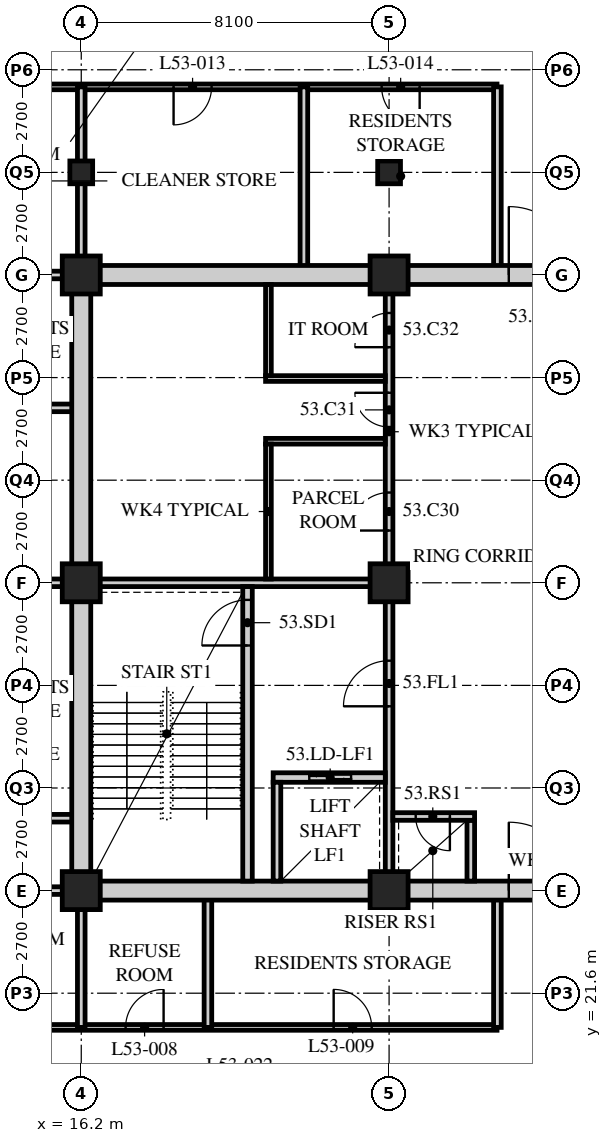
"""IFC4 building model, lengths in metres.
Left out: names, types, materials, properties, quantities, classifications, styles, units other than length and angle.
Written with IfcOpenShell. Run it as: python <this file> out.ifc"""

import sys

from ifc_helpers import new_model, si_unit, direction, frame, frame_2d, origin, origin_2d, place, context, subcontext, project, spatial, rectangle, hollow_rectangle, extrude, element, fill, save


model = new_model("IFC4")
c1 = context("Model", 3, precision=1e-05, world=origin(), true_north=direction((0.0, 1.0)))
c2 = subcontext(c1, "Body", "Model", "MODEL_VIEW")
j1 = project(units=[si_unit("LENGTHUNIT", "METRE"), si_unit("PLANEANGLEUNIT", "RADIAN")], contexts=[c1])
p1 = place(None, origin())
s1 = spatial("IfcSite", under=j1, at=p1, CompositionType="ELEMENT")
p2 = place(p1, origin())
s2 = spatial("IfcBuilding", under=s1, at=p2, CompositionType="ELEMENT")
p3 = place(p2, frame((0.0, 0.0, 206.4)))
s3 = spatial("IfcBuildingStorey", under=s2, at=p3, CompositionType="ELEMENT", Elevation=206.4)
for number, where, z_axis, x_axis in (
    (1, (16.2, 24.3, 0.0), (0.0, 0.0, 1.0), (1.0, 0.0, 0.0)),
    (2, (16.2, 32.4, 0.0), (0.0, 0.0, 1.0), (1.0, 0.0, 0.0)),
    (3, (16.2, 40.5, 0.0), (0.0, 0.0, 1.0), (1.0, 0.0, 0.0)),
):
    element("IfcColumn", number, at=place(p3, frame(where, z_axis=z_axis, x_axis=x_axis)), inside=s3, PredefinedType="COLUMN", context=c2, shape_type="SweptSolid", body=[
        extrude(hollow_rectangle(XDim=1.0, YDim=1.0, WallThickness=0.1, at=origin_2d()), origin(), (0.0, 0.0, 1.0), 3.6),
    ])
p4 = place(p3, frame((16.2, 43.2, 0.0), z_axis=(0.0, 0.0, 1.0), x_axis=(1.0, 0.0, 0.0)))
e4 = element("IfcColumn", 4, at=p4, inside=s3, PredefinedType="COLUMN", context=c2, shape_type="SweptSolid", body=[
    extrude(hollow_rectangle(XDim=0.6, YDim=0.6, WallThickness=0.05, at=origin_2d()), origin(), (0.0, 0.0, 1.0), 3.6),
])
for number, where, z_axis, x_axis in (
    (5, (24.3, 24.3, 0.0), (0.0, 0.0, 1.0), (1.0, 0.0, 0.0)),
    (6, (24.3, 32.4, 0.0), (0.0, 0.0, 1.0), (1.0, 0.0, 0.0)),
    (7, (24.3, 40.5, 0.0), (0.0, 0.0, 1.0), (1.0, 0.0, 0.0)),
):
    element("IfcColumn", number, at=place(p3, frame(where, z_axis=z_axis, x_axis=x_axis)), inside=s3, PredefinedType="COLUMN", context=c2, shape_type="SweptSolid", body=[
        extrude(hollow_rectangle(XDim=1.0, YDim=1.0, WallThickness=0.1, at=origin_2d()), origin(), (0.0, 0.0, 1.0), 3.6),
    ])
p5 = place(p3, frame((24.3, 43.2, 0.0), z_axis=(0.0, 0.0, 1.0), x_axis=(1.0, 0.0, 0.0)))
e8 = element("IfcColumn", 8, at=p5, inside=s3, PredefinedType="COLUMN", context=c2, shape_type="SweptSolid", body=[
    extrude(hollow_rectangle(XDim=0.6, YDim=0.6, WallThickness=0.05, at=origin_2d()), origin(), (0.0, 0.0, 1.0), 3.6),
])
p6 = place(p3, frame((27.14, 45.45, 0.0), z_axis=(0.0, 0.0, 1.0), x_axis=(-1.0, 0.0, 0.0)))
e9 = element("IfcWall", 9, at=p6, inside=s3, PredefinedType="PARTITIONING", context=c2, shape_type="SweptSolid", body=[
    extrude(rectangle(XDim=17.24, YDim=0.15, at=frame_2d((8.62, 0.0))), origin(), (0.0, 0.0, 1.0), 3.39),
])
p7 = place(p6, frame((15.94, 0.0, 0.0)))
e10 = element("IfcOpeningElement", 10, at=p7, cuts=e9, PredefinedType="OPENING", context=c2, shape_type="SweptSolid", body=[
    extrude(rectangle(XDim=1.0, YDim=2.1, at=frame_2d((0.5, 1.05))), frame((0.0, 0.085, 0.0), z_axis=(0.0, -1.0, 0.0), x_axis=(1.0, 0.0, 0.0)), (0.0, 0.0, 1.0), 0.17),
])
p8 = place(p6, frame((12.79, 0.0, 0.0)))
e11 = element("IfcOpeningElement", 11, at=p8, cuts=e9, PredefinedType="OPENING", context=c2, shape_type="SweptSolid", body=[
    extrude(rectangle(XDim=1.0, YDim=2.1, at=frame_2d((0.5, 1.05))), frame((0.0, 0.085, 0.0), z_axis=(0.0, -1.0, 0.0), x_axis=(1.0, 0.0, 0.0)), (0.0, 0.0, 1.0), 0.17),
])
p9 = place(p6, frame((7.511, 0.0, 0.0)))
e12 = element("IfcOpeningElement", 12, at=p9, cuts=e9, PredefinedType="OPENING", context=c2, shape_type="SweptSolid", body=[
    extrude(rectangle(XDim=1.0, YDim=2.1, at=frame_2d((0.5, 1.05))), frame((0.0, 0.085, 0.0), z_axis=(0.0, -1.0, 0.0), x_axis=(1.0, 0.0, 0.0)), (0.0, 0.0, 1.0), 0.17),
])
p10 = place(p6, frame((2.036, 0.0, 0.0)))
e13 = element("IfcOpeningElement", 13, at=p10, cuts=e9, PredefinedType="OPENING", context=c2, shape_type="SweptSolid", body=[
    extrude(rectangle(XDim=1.0, YDim=2.1, at=frame_2d((0.5, 1.05))), frame((0.0, 0.085, 0.0), z_axis=(0.0, -1.0, 0.0), x_axis=(1.0, 0.0, 0.0)), (0.0, 0.0, 1.0), 0.17),
])
p11 = place(p3, frame((9.9, 20.7, 0.0), z_axis=(0.0, 0.0, 1.0), x_axis=(1.0, 0.0, 0.0)))
e14 = element("IfcWall", 14, at=p11, inside=s3, PredefinedType="PARTITIONING", context=c2, shape_type="SweptSolid", body=[
    extrude(rectangle(XDim=17.24, YDim=0.15, at=frame_2d((8.62, 0.0))), origin(), (0.0, 0.0, 1.0), 3.39),
])
p12 = place(p11, frame((2.65, 0.0, 0.0)))
e15 = element("IfcOpeningElement", 15, at=p12, cuts=e14, PredefinedType="OPENING", context=c2, shape_type="SweptSolid", body=[
    extrude(rectangle(XDim=1.0, YDim=2.1, at=frame_2d((0.5, 1.05))), frame((0.0, 0.085, 0.0), z_axis=(0.0, -1.0, 0.0), x_axis=(1.0, 0.0, 0.0)), (0.0, 0.0, 1.0), 0.17),
])
p13 = place(p11, frame((7.467, 0.0, 0.0)))
e16 = element("IfcOpeningElement", 16, at=p13, cuts=e14, PredefinedType="OPENING", context=c2, shape_type="SweptSolid", body=[
    extrude(rectangle(XDim=1.0, YDim=2.1, at=frame_2d((0.5, 1.05))), frame((0.0, 0.085, 0.0), z_axis=(0.0, -1.0, 0.0), x_axis=(1.0, 0.0, 0.0)), (0.0, 0.0, 1.0), 0.17),
])
p14 = place(p11, frame((12.942, 0.0, 0.0)))
e17 = element("IfcOpeningElement", 17, at=p14, cuts=e14, PredefinedType="OPENING", context=c2, shape_type="SweptSolid", body=[
    extrude(rectangle(XDim=1.0, YDim=2.1, at=frame_2d((0.5, 1.05))), frame((0.0, 0.085, 0.0), z_axis=(0.0, -1.0, 0.0), x_axis=(1.0, 0.0, 0.0)), (0.0, 0.0, 1.0), 0.17),
])
for number, where, z_axis, x_axis in (
    (18, (9.9, 32.4, 0.0), (0.0, 0.0, 1.0), (1.0, 0.0, 0.0)),
    (19, (9.9, 26.205, 0.0), (0.0, 0.0, 1.0), (1.0, 0.0, 0.0)),
    (20, (9.9, 37.003, 0.0), (0.0, 0.0, 1.0), (1.0, 0.0, 0.0)),
):
    element("IfcWall", number, at=place(p3, frame(where, z_axis=z_axis, x_axis=x_axis)), inside=s3, PredefinedType="SOLIDWALL", context=c2, shape_type="SweptSolid", body=[
        extrude(rectangle(XDim=6.3, YDim=0.2, at=frame_2d((3.15, 0.0))), origin(), (0.0, 0.0, 1.0), 3.39),
    ])
p15 = place(p3, frame((16.2, 20.7, 0.0), z_axis=(0.0, 0.0, 1.0), x_axis=(0.0, 1.0, 0.0)))
e21 = element("IfcWall", 21, at=p15, inside=s3, PredefinedType="SOLIDWALL", context=c2, shape_type="SweptSolid", body=[
    extrude(rectangle(XDim=3.6, YDim=0.2, at=frame_2d((1.8, 0.0))), origin(), (0.0, 0.0, 1.0), 2.778),
])
for number, where, z_axis, x_axis in (
    (22, (19.533, 20.7, 0.0), (0.0, 0.0, 1.0), (0.0, 1.0, 0.0)),
    (23, (27.15, 20.7, 0.0), (0.0, 0.0, 1.0), (0.0, 1.0, 0.0)),
):
    element("IfcWall", number, at=place(p3, frame(where, z_axis=z_axis, x_axis=x_axis)), inside=s3, PredefinedType="SOLIDWALL", context=c2, shape_type="SweptSolid", body=[
        extrude(rectangle(XDim=3.6, YDim=0.2, at=frame_2d((1.8, 0.0))), origin(), (0.0, 0.0, 1.0), 3.39),
    ])
p16 = place(p3, frame((16.2, 40.5, 0.0), z_axis=(0.0, 0.0, 1.0), x_axis=(0.0, 1.0, 0.0)))
e24 = element("IfcWall", 24, at=p16, inside=s3, PredefinedType="SOLIDWALL", context=c2, shape_type="SweptSolid", body=[
    extrude(rectangle(XDim=4.95, YDim=0.2, at=frame_2d((2.475, 0.0))), origin(), (0.0, 0.0, 1.0), 2.69),
])
for number, where, z_axis, x_axis in (
    (25, (22.059, 45.45, 0.0), (0.0, 0.0, 1.0), (0.0, -1.0, 0.0)),
    (26, (27.15, 40.5, 0.0), (0.0, 0.0, 1.0), (0.0, 1.0, 0.0)),
):
    element("IfcWall", number, at=place(p3, frame(where, z_axis=z_axis, x_axis=x_axis)), inside=s3, PredefinedType="SOLIDWALL", context=c2, shape_type="SweptSolid", body=[
        extrude(rectangle(XDim=4.95, YDim=0.2, at=frame_2d((2.475, 0.0))), origin(), (0.0, 0.0, 1.0), 3.39),
    ])
for number, where, z_axis, x_axis in (
    (27, (9.9, 24.3, 0.0), (0.0, 0.0, 1.0), (1.0, 0.0, 0.0)),
    (28, (9.9, 40.5, 0.0), (0.0, 0.0, 1.0), (1.0, 0.0, 0.0)),
):
    element("IfcWall", number, at=place(p3, frame(where, z_axis=z_axis, x_axis=x_axis)), inside=s3, PredefinedType="SOLIDWALL", context=c2, shape_type="SweptSolid", body=[
        extrude(rectangle(XDim=6.3, YDim=0.2, at=frame_2d((3.15, 0.0))), origin(), (0.0, 0.0, 1.0), 3.39),
    ])
p17 = place(p3, frame((15.95, 24.3, 0.0), z_axis=(0.0, 0.0, 1.0), x_axis=(1.0, 0.0, 0.0)))
e29 = element("IfcWall", 29, at=p17, inside=s3, PredefinedType="SOLIDWALL", context=c2, shape_type="SweptSolid", body=[
    extrude(rectangle(XDim=24.8, YDim=0.5, at=frame_2d((12.4, 0.0))), origin(), (0.0, 0.0, 1.0), 2.74),
])
p18 = place(p17, frame((11.5, 0.0, 0.0)))
e30 = element("IfcOpeningElement", 30, at=p18, cuts=e29, PredefinedType="OPENING", context=c2, shape_type="SweptSolid", body=[
    extrude(rectangle(XDim=1.8, YDim=2.4, at=frame_2d((0.9, 1.2))), frame((0.0, 0.26, 0.0), z_axis=(0.0, -1.0, 0.0), x_axis=(1.0, 0.0, 0.0)), (0.0, 0.0, 1.0), 0.52),
])
p19 = place(p3, frame((15.95, 40.5, 0.0), z_axis=(0.0, 0.0, 1.0), x_axis=(1.0, 0.0, 0.0)))
e31 = element("IfcWall", 31, at=p19, inside=s3, PredefinedType="SOLIDWALL", context=c2, shape_type="SweptSolid", body=[
    extrude(rectangle(XDim=24.8, YDim=0.5, at=frame_2d((12.4, 0.0))), origin(), (0.0, 0.0, 1.0), 2.74),
])
p20 = place(p19, frame((11.5, 0.0, 0.0)))
e32 = element("IfcOpeningElement", 32, at=p20, cuts=e31, PredefinedType="OPENING", context=c2, shape_type="SweptSolid", body=[
    extrude(rectangle(XDim=1.8, YDim=2.4, at=frame_2d((0.9, 1.2))), frame((0.0, 0.26, 0.0), z_axis=(0.0, -1.0, 0.0), x_axis=(1.0, 0.0, 0.0)), (0.0, 0.0, 1.0), 0.52),
])
p21 = place(p3, frame((16.2, 24.55, 0.0), z_axis=(0.0, 0.0, 1.0), x_axis=(0.0, 1.0, 0.0)))
e33 = element("IfcWall", 33, at=p21, inside=s3, PredefinedType="SOLIDWALL", context=c2, shape_type="SweptSolid", body=[
    extrude(rectangle(XDim=15.7, YDim=0.5, at=frame_2d((7.85, 0.0))), origin(), (0.0, 0.0, 1.0), 2.778),
])
p22 = place(p3, frame((16.45, 32.4, 0.0), z_axis=(0.0, 0.0, 1.0), x_axis=(1.0, 0.0, 0.0)))
e34 = element("IfcWall", 34, at=p22, inside=s3, PredefinedType="SOLIDWALL", context=c2, shape_type="SweptSolid", body=[
    extrude(rectangle(XDim=7.95, YDim=0.2, at=frame_2d((3.975, 0.0))), origin(), (0.0, 0.0, 1.0), 2.778),
])
p23 = place(p3, frame((24.3, 24.55, 0.0), z_axis=(0.0, 0.0, 1.0), x_axis=(0.0, 1.0, 0.0)))
e35 = element("IfcWall", 35, at=p23, inside=s3, PredefinedType="SOLIDWALL", context=c2, shape_type="SweptSolid", body=[
    extrude(rectangle(XDim=7.75, YDim=0.2, at=frame_2d((3.875, 0.0))), origin(), (0.0, 0.0, 1.0), 2.778),
])
p24 = place(p23, frame((4.6, 0.0, 0.0)))
e36 = element("IfcOpeningElement", 36, at=p24, cuts=e35, PredefinedType="OPENING", context=c2, shape_type="SweptSolid", body=[
    extrude(rectangle(XDim=1.2, YDim=2.1, at=frame_2d((0.6, 1.05))), frame((0.0, 0.11, 0.0), z_axis=(0.0, -1.0, 0.0), x_axis=(1.0, 0.0, 0.0)), (0.0, 0.0, 1.0), 0.22),
])
p25 = place(p3, frame((20.575, 24.55, 0.0), z_axis=(0.0, 0.0, 1.0), x_axis=(0.0, 1.0, 0.0)))
e37 = element("IfcWall", 37, at=p25, inside=s3, PredefinedType="SOLIDWALL", context=c2, shape_type="SweptSolid", body=[
    extrude(rectangle(XDim=7.75, YDim=0.25, at=frame_2d((3.875, 0.0))), origin(), (0.0, 0.0, 1.0), 3.39),
])
p26 = place(p25, frame((6.2, 0.0, 0.0)))
e38 = element("IfcOpeningElement", 38, at=p26, cuts=e37, PredefinedType="OPENING", context=c2, shape_type="SweptSolid", body=[
    extrude(rectangle(XDim=1.2, YDim=2.1, at=frame_2d((0.6, 1.05))), frame((0.0, 0.135, 0.0), z_axis=(0.0, -1.0, 0.0), x_axis=(1.0, 0.0, 0.0)), (0.0, 0.0, 1.0), 0.27),
])
p27 = place(p3, frame((21.25, 27.275, 0.0), z_axis=(0.0, 0.0, 1.0), x_axis=(1.0, 0.0, 0.0)))
e39 = element("IfcWall", 39, at=p27, inside=s3, PredefinedType="SOLIDWALL", context=c2, shape_type="SweptSolid", body=[
    extrude(rectangle(XDim=2.95, YDim=0.25, at=frame_2d((1.475, 0.0))), origin(), (0.0, 0.0, 1.0), 3.39),
])
p28 = place(p27, frame((0.95, 0.0, 0.0)))
e40 = element("IfcOpeningElement", 40, at=p28, cuts=e39, PredefinedType="OPENING", context=c2, shape_type="SweptSolid", body=[
    extrude(rectangle(XDim=1.1, YDim=2.4, at=frame_2d((0.55, 1.2))), frame((0.0, 0.135, 0.0), z_axis=(0.0, -1.0, 0.0), x_axis=(1.0, 0.0, 0.0)), (0.0, 0.0, 1.0), 0.27),
])
p29 = place(p3, frame((21.35, 24.55, 0.0), z_axis=(0.0, 0.0, 1.0), x_axis=(0.0, 1.0, 0.0)))
e41 = element("IfcWall", 41, at=p29, inside=s3, PredefinedType="SOLIDWALL", context=c2, shape_type="SweptSolid", body=[
    extrude(rectangle(XDim=2.6, YDim=0.2, at=frame_2d((1.3, 0.0))), origin(), (0.0, 0.0, 1.0), 3.39),
])
p30 = place(p3, frame((26.45, 24.55, 0.0), z_axis=(0.0, 0.0, 1.0), x_axis=(0.0, 1.0, 0.0)))
e42 = element("IfcWall", 42, at=p30, inside=s3, PredefinedType="SOLIDWALL", context=c2, shape_type="SweptSolid", body=[
    extrude(rectangle(XDim=1.6, YDim=0.2, at=frame_2d((0.8, 0.0))), origin(), (0.0, 0.0, 1.0), 3.39),
])
p31 = place(p3, frame((24.4, 26.25, 0.0), z_axis=(0.0, 0.0, 1.0), x_axis=(1.0, 0.0, 0.0)))
e43 = element("IfcWall", 43, at=p31, inside=s3, PredefinedType="SOLIDWALL", context=c2, shape_type="SweptSolid", body=[
    extrude(rectangle(XDim=2.15, YDim=0.2, at=frame_2d((1.075, 0.0))), origin(), (0.0, 0.0, 1.0), 3.39),
])
p32 = place(p31, frame((0.6, 0.0, 0.0)))
e44 = element("IfcOpeningElement", 44, at=p32, cuts=e43, PredefinedType="OPENING", context=c2, shape_type="SweptSolid", body=[
    extrude(rectangle(XDim=0.9, YDim=2.1, at=frame_2d((0.45, 1.05))), frame((0.0, 0.11, 0.0), z_axis=(0.0, -1.0, 0.0), x_axis=(1.0, 0.0, 0.0)), (0.0, 0.0, 1.0), 0.22),
])
p33 = place(p3, frame((24.3, 32.5, 0.0), z_axis=(0.0, 0.0, 1.0), x_axis=(0.0, 1.0, 0.0)))
e45 = element("IfcWall", 45, at=p33, inside=s3, PredefinedType="PARTITIONING", context=c2, shape_type="SweptSolid", body=[
    extrude(rectangle(XDim=7.75, YDim=0.2, at=frame_2d((3.875, 0.0))), origin(), (0.0, 0.0, 1.0), 2.778),
])
p34 = place(p33, frame((1.275, 0.0, 0.0)))
e46 = element("IfcOpeningElement", 46, at=p34, cuts=e45, PredefinedType="OPENING", context=c2, shape_type="SweptSolid", body=[
    extrude(rectangle(XDim=1.0, YDim=2.1, at=frame_2d((0.5, 1.05))), frame((0.0, 0.11, 0.0), z_axis=(0.0, -1.0, 0.0), x_axis=(1.0, 0.0, 0.0)), (0.0, 0.0, 1.0), 0.22),
])
p35 = place(p33, frame((4.0, 0.0, 0.0)))
e47 = element("IfcOpeningElement", 47, at=p35, cuts=e45, PredefinedType="OPENING", context=c2, shape_type="SweptSolid", body=[
    extrude(rectangle(XDim=0.9, YDim=2.1, at=frame_2d((0.45, 1.05))), frame((0.0, 0.11, 0.0), z_axis=(0.0, -1.0, 0.0), x_axis=(1.0, 0.0, 0.0)), (0.0, 0.0, 1.0), 0.22),
])
p36 = place(p33, frame((6.1, 0.0, 0.0)))
e48 = element("IfcOpeningElement", 48, at=p36, cuts=e45, PredefinedType="OPENING", context=c2, shape_type="SweptSolid", body=[
    extrude(rectangle(XDim=0.9, YDim=2.1, at=frame_2d((0.45, 1.05))), frame((0.0, 0.11, 0.0), z_axis=(0.0, -1.0, 0.0), x_axis=(1.0, 0.0, 0.0)), (0.0, 0.0, 1.0), 0.22),
])
for number, where, z_axis, x_axis in (
    (49, (21.05, 36.125, 0.0), (0.0, 0.0, 1.0), (1.0, 0.0, 0.0)),
    (50, (21.05, 37.775, 0.0), (0.0, 0.0, 1.0), (1.0, 0.0, 0.0)),
):
    element("IfcWall", number, at=place(p3, frame(where, z_axis=z_axis, x_axis=x_axis)), inside=s3, PredefinedType="PARTITIONING", context=c2, shape_type="SweptSolid", body=[
        extrude(rectangle(XDim=3.15, YDim=0.15, at=frame_2d((1.575, 0.0))), origin(), (0.0, 0.0, 1.0), 3.39),
    ])
p37 = place(p3, frame((21.125, 32.5, 0.0), z_axis=(0.0, 0.0, 1.0), x_axis=(0.0, 1.0, 0.0)))
e51 = element("IfcWall", 51, at=p37, inside=s3, PredefinedType="PARTITIONING", context=c2, shape_type="SweptSolid", body=[
    extrude(rectangle(XDim=3.55, YDim=0.15, at=frame_2d((1.775, 0.0))), origin(), (0.0, 0.0, 1.0), 3.39),
])
p38 = place(p3, frame((21.125, 37.85, 0.0), z_axis=(0.0, 0.0, 1.0), x_axis=(0.0, 1.0, 0.0)))
e52 = element("IfcWall", 52, at=p38, inside=s3, PredefinedType="PARTITIONING", context=c2, shape_type="SweptSolid", body=[
    extrude(rectangle(XDim=2.4, YDim=0.15, at=frame_2d((1.2, 0.0))), origin(), (0.0, 0.0, 1.0), 3.39),
])
p39 = place(p13, origin())
e53 = element("IfcDoor", 53, at=p39, inside=s3, OperationType="SINGLE_SWING_RIGHT", PredefinedType="DOOR", context=c2, shape_type="SweptSolid", body=[
    extrude(rectangle(XDim=1.0, YDim=2.1, at=frame_2d((0.5, 1.05))), frame((0.0, 0.025, 0.0), z_axis=(0.0, -1.0, 0.0), x_axis=(1.0, 0.0, 0.0)), (0.0, 0.0, 1.0), 0.05),
])
fill(e16, e53)
p40 = place(p14, origin())
e54 = element("IfcDoor", 54, at=p40, inside=s3, OperationType="SINGLE_SWING_LEFT", PredefinedType="DOOR", context=c2, shape_type="SweptSolid", body=[
    extrude(rectangle(XDim=1.0, YDim=2.1, at=frame_2d((0.5, 1.05))), frame((0.0, 0.025, 0.0), z_axis=(0.0, -1.0, 0.0), x_axis=(1.0, 0.0, 0.0)), (0.0, 0.0, 1.0), 0.05),
])
fill(e17, e54)
p41 = place(p9, origin())
e55 = element("IfcDoor", 55, at=p41, inside=s3, OperationType="SINGLE_SWING_RIGHT", PredefinedType="DOOR", context=c2, shape_type="SweptSolid", body=[
    extrude(rectangle(XDim=1.0, YDim=2.1, at=frame_2d((0.5, 1.05))), frame((0.0, 0.025, 0.0), z_axis=(0.0, -1.0, 0.0), x_axis=(1.0, 0.0, 0.0)), (0.0, 0.0, 1.0), 0.05),
])
fill(e12, e55)
p42 = place(p10, origin())
e56 = element("IfcDoor", 56, at=p42, inside=s3, OperationType="SINGLE_SWING_LEFT", PredefinedType="DOOR", context=c2, shape_type="SweptSolid", body=[
    extrude(rectangle(XDim=1.0, YDim=2.1, at=frame_2d((0.5, 1.05))), frame((0.0, 0.025, 0.0), z_axis=(0.0, -1.0, 0.0), x_axis=(1.0, 0.0, 0.0)), (0.0, 0.0, 1.0), 0.05),
])
fill(e13, e56)
p43 = place(p34, origin())
e57 = element("IfcDoor", 57, at=p43, inside=s3, OperationType="SINGLE_SWING_LEFT", PredefinedType="DOOR", context=c2, shape_type="SweptSolid", body=[
    extrude(rectangle(XDim=1.0, YDim=2.1, at=frame_2d((0.5, 1.05))), frame((0.0, 0.025, 0.0), z_axis=(0.0, -1.0, 0.0), x_axis=(1.0, 0.0, 0.0)), (0.0, 0.0, 1.0), 0.05),
])
fill(e46, e57)
p44 = place(p35, origin())
e58 = element("IfcDoor", 58, at=p44, inside=s3, OperationType="SINGLE_SWING_RIGHT", PredefinedType="DOOR", context=c2, shape_type="SweptSolid", body=[
    extrude(rectangle(XDim=0.9, YDim=2.1, at=frame_2d((0.45, 1.05))), frame((0.0, 0.025, 0.0), z_axis=(0.0, -1.0, 0.0), x_axis=(1.0, 0.0, 0.0)), (0.0, 0.0, 1.0), 0.05),
])
fill(e47, e58)
p45 = place(p36, origin())
e59 = element("IfcDoor", 59, at=p45, inside=s3, OperationType="SINGLE_SWING_LEFT", PredefinedType="DOOR", context=c2, shape_type="SweptSolid", body=[
    extrude(rectangle(XDim=0.9, YDim=2.1, at=frame_2d((0.45, 1.05))), frame((0.0, 0.025, 0.0), z_axis=(0.0, -1.0, 0.0), x_axis=(1.0, 0.0, 0.0)), (0.0, 0.0, 1.0), 0.05),
])
fill(e48, e59)
p46 = place(p26, origin())
e60 = element("IfcDoor", 60, at=p46, inside=s3, OperationType="SINGLE_SWING_LEFT", PredefinedType="DOOR", context=c2, shape_type="SweptSolid", body=[
    extrude(rectangle(XDim=1.2, YDim=2.1, at=frame_2d((0.6, 1.05))), frame((0.0, 0.025, 0.0), z_axis=(0.0, -1.0, 0.0), x_axis=(1.0, 0.0, 0.0)), (0.0, 0.0, 1.0), 0.05),
])
fill(e38, e60)
p47 = place(p24, origin())
e61 = element("IfcDoor", 61, at=p47, inside=s3, OperationType="SINGLE_SWING_LEFT", PredefinedType="DOOR", context=c2, shape_type="SweptSolid", body=[
    extrude(rectangle(XDim=1.2, YDim=2.1, at=frame_2d((0.6, 1.05))), frame((0.0, 0.025, 0.0), z_axis=(0.0, -1.0, 0.0), x_axis=(1.0, 0.0, 0.0)), (0.0, 0.0, 1.0), 0.05),
])
fill(e36, e61)
p48 = place(p32, origin())
e62 = element("IfcDoor", 62, at=p48, inside=s3, OperationType="SINGLE_SWING_LEFT", PredefinedType="DOOR", context=c2, shape_type="SweptSolid", body=[
    extrude(rectangle(XDim=0.9, YDim=2.1, at=frame_2d((0.45, 1.05))), frame((0.0, 0.025, 0.0), z_axis=(0.0, -1.0, 0.0), x_axis=(1.0, 0.0, 0.0)), (0.0, 0.0, 1.0), 0.05),
])
fill(e44, e62)
p49 = place(p28, origin())
e63 = element("IfcDoor", 63, at=p49, inside=s3, OperationType="DOUBLE_DOOR_SLIDING", PredefinedType="DOOR", context=c2, shape_type="SweptSolid", body=[
    extrude(rectangle(XDim=1.1, YDim=2.4, at=frame_2d((0.55, 1.2))), frame((0.0, 0.025, 0.0), z_axis=(0.0, -1.0, 0.0), x_axis=(1.0, 0.0, 0.0)), (0.0, 0.0, 1.0), 0.05),
])
fill(e40, e63)
p50 = place(p18, origin())
e64 = element("IfcDoor", 64, at=p50, inside=s3, OperationType="DOUBLE_DOOR_SINGLE_SWING", PredefinedType="DOOR", context=c2, shape_type="SweptSolid", body=[
    extrude(rectangle(XDim=1.8, YDim=2.4, at=frame_2d((0.9, 1.2))), frame((0.0, 0.025, 0.0), z_axis=(0.0, -1.0, 0.0), x_axis=(1.0, 0.0, 0.0)), (0.0, 0.0, 1.0), 0.05),
])
fill(e30, e64)
p51 = place(p20, origin())
e65 = element("IfcDoor", 65, at=p51, inside=s3, OperationType="DOUBLE_DOOR_SINGLE_SWING", PredefinedType="DOOR", context=c2, shape_type="SweptSolid", body=[
    extrude(rectangle(XDim=1.8, YDim=2.4, at=frame_2d((0.9, 1.2))), frame((0.0, 0.025, 0.0), z_axis=(0.0, -1.0, 0.0), x_axis=(1.0, 0.0, 0.0)), (0.0, 0.0, 1.0), 0.05),
])
fill(e32, e65)
save(model, sys.argv[1])
